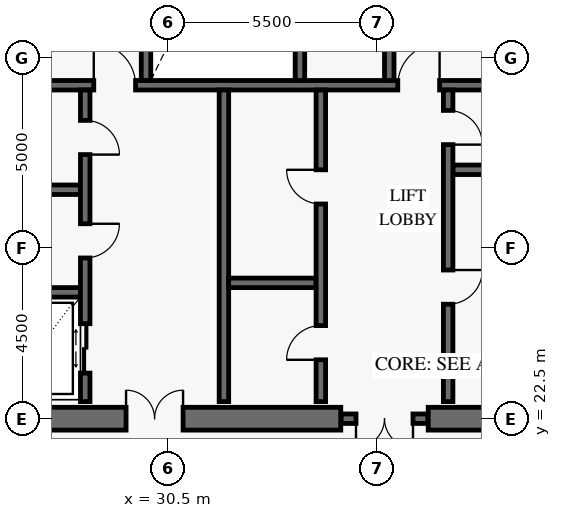
"""IFC4 building model, lengths in metres.
Left out: names, types, materials, properties, quantities, classifications, styles, units other than length and angle.
Written with IfcOpenShell. Run it as: python <this file> out.ifc"""

import sys

from ifc_helpers import new_model, si_unit, direction, frame, frame_2d, origin, place, context, subcontext, project, spatial, rectangle, extrude, element, fill, save


model = new_model("IFC4")
c1 = context("Model", 3, precision=1e-05, world=origin(), true_north=direction((0.0, 1.0)))
c2 = subcontext(c1, "Body", "Model", "MODEL_VIEW")
j1 = project(units=[si_unit("LENGTHUNIT", "METRE"), si_unit("PLANEANGLEUNIT", "RADIAN")], contexts=[c1])
p1 = place(None, origin())
s1 = spatial("IfcSite", under=j1, at=p1, CompositionType="ELEMENT")
p2 = place(p1, origin())
s2 = spatial("IfcBuilding", under=s1, at=p2, CompositionType="ELEMENT")
p3 = place(p2, frame((0.0, 0.0, 265.4)))
s3 = spatial("IfcBuildingStorey", under=s2, at=p3, CompositionType="ELEMENT", Elevation=265.4)
p4 = place(p3, frame((25.2, 22.5, 0.0), z_axis=(0.0, 0.0, 1.0), x_axis=(1.0, 0.0, 0.0)))
e1 = element("IfcWall", 1, at=p4, inside=s3, PredefinedType="SHEAR", context=c2, shape_type="SweptSolid", body=[
    extrude(rectangle(XDim=9.85, YDim=0.6, at=frame_2d((4.925, 0.0))), origin(), (0.0, 0.0, 1.0), 3.8),
])
p5 = place(p4, frame((4.2, 0.0, 0.0)))
e2 = element("IfcOpeningElement", 2, at=p5, cuts=e1, PredefinedType="OPENING", context=c2, shape_type="SweptSolid", body=[
    extrude(rectangle(XDim=1.5, YDim=2.15, at=frame_2d((0.75, 1.075))), frame((0.0, 0.312, 0.0), z_axis=(0.0, -1.0, 0.0), x_axis=(1.0, 0.0, 0.0)), (0.0, 0.0, 1.0), 0.624),
])
p6 = place(p3, frame((37.35, 22.5, 0.0), z_axis=(0.0, 0.0, 1.0), x_axis=(1.0, 0.0, 0.0)))
e3 = element("IfcWall", 3, at=p6, inside=s3, PredefinedType="SHEAR", context=c2, shape_type="SweptSolid", body=[
    extrude(rectangle(XDim=9.45, YDim=0.6, at=frame_2d((4.725, 0.0))), origin(), (0.0, 0.0, 1.0), 3.8),
])
p7 = place(p6, frame((3.95, 0.0, 0.0)))
e4 = element("IfcOpeningElement", 4, at=p7, cuts=e3, PredefinedType="OPENING", context=c2, shape_type="SweptSolid", body=[
    extrude(rectangle(XDim=1.5, YDim=2.15, at=frame_2d((0.75, 1.075))), frame((0.0, 0.312, 0.0), z_axis=(0.0, -1.0, 0.0), x_axis=(1.0, 0.0, 0.0)), (0.0, 0.0, 1.0), 0.624),
])
p8 = place(p3, frame((35.06, 22.5, 0.0), z_axis=(0.0, 0.0, 1.0), x_axis=(1.0, 0.0, 0.0)))
e5 = element("IfcWall", 5, at=p8, inside=s3, PredefinedType="SOLIDWALL", context=c2, shape_type="SweptSolid", body=[
    extrude(rectangle(XDim=2.28, YDim=0.25, at=frame_2d((1.14, 0.0))), origin(), (0.0, 0.0, 1.0), 3.8),
])
p9 = place(p8, frame((0.39, 0.0, 0.0)))
e6 = element("IfcOpeningElement", 6, at=p9, cuts=e5, PredefinedType="OPENING", context=c2, shape_type="SweptSolid", body=[
    extrude(rectangle(XDim=1.5, YDim=2.15, at=frame_2d((0.75, 1.075))), frame((0.0, 0.137, 0.0), z_axis=(0.0, -1.0, 0.0), x_axis=(1.0, 0.0, 0.0)), (0.0, 0.0, 1.0), 0.274),
])
p10 = place(p3, frame((25.95, 31.275, 0.0), z_axis=(0.0, 0.0, 1.0), x_axis=(1.0, 0.0, 0.0)))
e7 = element("IfcWall", 7, at=p10, inside=s3, PredefinedType="SOLIDWALL", context=c2, shape_type="SweptSolid", body=[
    extrude(rectangle(XDim=20.1, YDim=0.25, at=frame_2d((10.05, 0.0))), origin(), (0.0, 0.0, 1.0), 3.8),
])
p11 = place(p10, frame((2.6, 0.0, 0.0)))
e8 = element("IfcOpeningElement", 8, at=p11, cuts=e7, PredefinedType="OPENING", context=c2, shape_type="SweptSolid", body=[
    extrude(rectangle(XDim=1.1, YDim=2.15, at=frame_2d((0.55, 1.075))), frame((0.0, 0.137, 0.0), z_axis=(0.0, -1.0, 0.0), x_axis=(1.0, 0.0, 0.0)), (0.0, 0.0, 1.0), 0.274),
])
p12 = place(p10, frame((10.6, 0.0, 0.0)))
e9 = element("IfcOpeningElement", 9, at=p12, cuts=e7, PredefinedType="OPENING", context=c2, shape_type="SweptSolid", body=[
    extrude(rectangle(XDim=1.1, YDim=2.15, at=frame_2d((0.55, 1.075))), frame((0.0, 0.137, 0.0), z_axis=(0.0, -1.0, 0.0), x_axis=(1.0, 0.0, 0.0)), (0.0, 0.0, 1.0), 0.274),
])
p13 = place(p10, frame((16.35, 0.0, 0.0)))
e10 = element("IfcOpeningElement", 10, at=p13, cuts=e7, PredefinedType="OPENING", context=c2, shape_type="SweptSolid", body=[
    extrude(rectangle(XDim=1.1, YDim=2.15, at=frame_2d((0.55, 1.075))), frame((0.0, 0.137, 0.0), z_axis=(0.0, -1.0, 0.0), x_axis=(1.0, 0.0, 0.0)), (0.0, 0.0, 1.0), 0.274),
])
for number, where, z_axis, x_axis in (
    (11, (29.925, 31.4, 0.0), (0.0, 0.0, 1.0), (0.0, 1.0, 0.0)),
    (12, (33.975, 31.4, 0.0), (0.0, 0.0, 1.0), (0.0, 1.0, 0.0)),
):
    element("IfcWall", number, at=place(p3, frame(where, z_axis=z_axis, x_axis=x_axis)), inside=s3, PredefinedType="SOLIDWALL", context=c2, shape_type="SweptSolid", body=[
        extrude(rectangle(XDim=9.7, YDim=0.25, at=frame_2d((4.85, 0.0))), origin(), (0.0, 0.0, 1.0), 3.8),
    ])
p14 = place(p3, frame((36.325, 31.4, 0.0), z_axis=(0.0, 0.0, 1.0), x_axis=(0.0, 1.0, 0.0)))
e13 = element("IfcWall", 13, at=p14, inside=s3, PredefinedType="SOLIDWALL", context=c2, shape_type="SweptSolid", body=[
    extrude(rectangle(XDim=9.65, YDim=0.25, at=frame_2d((4.825, 0.0))), origin(), (0.0, 0.0, 1.0), 3.8),
])
p15 = place(p14, frame((2.965, 0.0, 0.0)))
e14 = element("IfcOpeningElement", 14, at=p15, cuts=e13, PredefinedType="OPENING", context=c2, shape_type="SweptSolid", body=[
    extrude(rectangle(XDim=0.9, YDim=2.1, at=frame_2d((0.45, 1.05))), frame((0.0, 0.137, 0.0), z_axis=(0.0, -1.0, 0.0), x_axis=(1.0, 0.0, 0.0)), (0.0, 0.0, 1.0), 0.274),
])
p16 = place(p14, frame((7.885, 0.0, 0.0)))
e15 = element("IfcOpeningElement", 15, at=p16, cuts=e13, PredefinedType="OPENING", context=c2, shape_type="SweptSolid", body=[
    extrude(rectangle(XDim=0.9, YDim=2.1, at=frame_2d((0.45, 1.05))), frame((0.0, 0.137, 0.0), z_axis=(0.0, -1.0, 0.0), x_axis=(1.0, 0.0, 0.0)), (0.0, 0.0, 1.0), 0.274),
])
for number, where, z_axis, x_axis in (
    (16, (25.95, 25.825, 0.0), (0.0, 0.0, 1.0), (1.0, 0.0, 0.0)),
    (17, (25.95, 28.525, 0.0), (0.0, 0.0, 1.0), (1.0, 0.0, 0.0)),
):
    element("IfcWall", number, at=place(p3, frame(where, z_axis=z_axis, x_axis=x_axis)), inside=s3, PredefinedType="SOLIDWALL", context=c2, shape_type="SweptSolid", body=[
        extrude(rectangle(XDim=2.25, YDim=0.25, at=frame_2d((1.125, 0.0))), origin(), (0.0, 0.0, 1.0), 3.8),
    ])
p17 = place(p3, frame((28.325, 22.95, 0.0), z_axis=(0.0, 0.0, 1.0), x_axis=(0.0, 1.0, 0.0)))
e18 = element("IfcWall", 18, at=p17, inside=s3, PredefinedType="SOLIDWALL", context=c2, shape_type="SweptSolid", body=[
    extrude(rectangle(XDim=8.2, YDim=0.25, at=frame_2d((4.1, 0.0))), origin(), (0.0, 0.0, 1.0), 3.8),
])
p18 = place(p17, frame((0.75, 0.0, 0.0)))
e19 = element("IfcOpeningElement", 19, at=p18, cuts=e18, PredefinedType="OPENING", context=c2, shape_type="SweptSolid", body=[
    extrude(rectangle(XDim=1.3, YDim=2.3, at=frame_2d((0.65, 1.15))), frame((0.0, 0.137, 0.0), z_axis=(0.0, -1.0, 0.0), x_axis=(1.0, 0.0, 0.0)), (0.0, 0.0, 1.0), 0.274),
])
p19 = place(p17, frame((3.78, 0.0, 0.0)))
e20 = element("IfcOpeningElement", 20, at=p19, cuts=e18, PredefinedType="OPENING", context=c2, shape_type="SweptSolid", body=[
    extrude(rectangle(XDim=0.9, YDim=2.1, at=frame_2d((0.45, 1.05))), frame((0.0, 0.137, 0.0), z_axis=(0.0, -1.0, 0.0), x_axis=(1.0, 0.0, 0.0)), (0.0, 0.0, 1.0), 0.274),
])
p20 = place(p17, frame((6.5, 0.0, 0.0)))
e21 = element("IfcOpeningElement", 21, at=p20, cuts=e18, PredefinedType="OPENING", context=c2, shape_type="SweptSolid", body=[
    extrude(rectangle(XDim=0.9, YDim=2.1, at=frame_2d((0.45, 1.05))), frame((0.0, 0.137, 0.0), z_axis=(0.0, -1.0, 0.0), x_axis=(1.0, 0.0, 0.0)), (0.0, 0.0, 1.0), 0.274),
])
p21 = place(p3, frame((31.975, 22.95, 0.0), z_axis=(0.0, 0.0, 1.0), x_axis=(0.0, 1.0, 0.0)))
e22 = element("IfcWall", 22, at=p21, inside=s3, PredefinedType="SOLIDWALL", context=c2, shape_type="SweptSolid", body=[
    extrude(rectangle(XDim=8.2, YDim=0.25, at=frame_2d((4.1, 0.0))), origin(), (0.0, 0.0, 1.0), 3.8),
])
p22 = place(p3, frame((32.1, 26.075, 0.0), z_axis=(0.0, 0.0, 1.0), x_axis=(1.0, 0.0, 0.0)))
e23 = element("IfcWall", 23, at=p22, inside=s3, PredefinedType="SOLIDWALL", context=c2, shape_type="SweptSolid", body=[
    extrude(rectangle(XDim=2.3, YDim=0.25, at=frame_2d((1.15, 0.0))), origin(), (0.0, 0.0, 1.0), 3.8),
])
p23 = place(p3, frame((34.525, 22.95, 0.0), z_axis=(0.0, 0.0, 1.0), x_axis=(0.0, 1.0, 0.0)))
e24 = element("IfcWall", 24, at=p23, inside=s3, PredefinedType="SOLIDWALL", context=c2, shape_type="SweptSolid", body=[
    extrude(rectangle(XDim=8.2, YDim=0.25, at=frame_2d((4.1, 0.0))), origin(), (0.0, 0.0, 1.0), 3.8),
])
p24 = place(p23, frame((1.1, 0.0, 0.0)))
e25 = element("IfcOpeningElement", 25, at=p24, cuts=e24, PredefinedType="OPENING", context=c2, shape_type="SweptSolid", body=[
    extrude(rectangle(XDim=0.9, YDim=2.1, at=frame_2d((0.45, 1.05))), frame((0.0, 0.137, 0.0), z_axis=(0.0, -1.0, 0.0), x_axis=(1.0, 0.0, 0.0)), (0.0, 0.0, 1.0), 0.274),
])
p25 = place(p23, frame((5.2, 0.0, 0.0)))
e26 = element("IfcOpeningElement", 26, at=p25, cuts=e24, PredefinedType="OPENING", context=c2, shape_type="SweptSolid", body=[
    extrude(rectangle(XDim=0.9, YDim=2.1, at=frame_2d((0.45, 1.05))), frame((0.0, 0.137, 0.0), z_axis=(0.0, -1.0, 0.0), x_axis=(1.0, 0.0, 0.0)), (0.0, 0.0, 1.0), 0.274),
])
p26 = place(p3, frame((38.0, 29.05, 0.0), z_axis=(0.0, 0.0, 1.0), x_axis=(1.0, 0.0, 0.0)))
e27 = element("IfcWall", 27, at=p26, inside=s3, PredefinedType="SOLIDWALL", context=c2, shape_type="SweptSolid", body=[
    extrude(rectangle(XDim=2.3, YDim=0.25, at=frame_2d((1.15, 0.0))), origin(), (0.0, 0.0, 1.0), 3.8),
])
p27 = place(p3, frame((37.875, 22.95, 0.0), z_axis=(0.0, 0.0, 1.0), x_axis=(0.0, 1.0, 0.0)))
e28 = element("IfcWall", 28, at=p27, inside=s3, PredefinedType="SOLIDWALL", context=c2, shape_type="SweptSolid", body=[
    extrude(rectangle(XDim=8.2, YDim=0.25, at=frame_2d((4.1, 0.0))), origin(), (0.0, 0.0, 1.0), 3.8),
])
p28 = place(p27, frame((2.562, 0.0, 0.0)))
e29 = element("IfcOpeningElement", 29, at=p28, cuts=e28, PredefinedType="OPENING", context=c2, shape_type="SweptSolid", body=[
    extrude(rectangle(XDim=0.9, YDim=2.1, at=frame_2d((0.45, 1.05))), frame((0.0, 0.137, 0.0), z_axis=(0.0, -1.0, 0.0), x_axis=(1.0, 0.0, 0.0)), (0.0, 0.0, 1.0), 0.274),
])
p29 = place(p27, frame((6.762, 0.0, 0.0)))
e30 = element("IfcOpeningElement", 30, at=p29, cuts=e28, PredefinedType="OPENING", context=c2, shape_type="SweptSolid", body=[
    extrude(rectangle(XDim=0.9, YDim=2.1, at=frame_2d((0.45, 1.05))), frame((0.0, 0.137, 0.0), z_axis=(0.0, -1.0, 0.0), x_axis=(1.0, 0.0, 0.0)), (0.0, 0.0, 1.0), 0.274),
])
p30 = place(p5, origin())
e31 = element("IfcDoor", 31, at=p30, inside=s3, OperationType="DOUBLE_DOOR_SINGLE_SWING", PredefinedType="DOOR", context=c2, shape_type="SweptSolid", body=[
    extrude(rectangle(XDim=1.5, YDim=2.15, at=frame_2d((0.75, 1.075))), frame((0.0, 0.025, 0.0), z_axis=(0.0, -1.0, 0.0), x_axis=(1.0, 0.0, 0.0)), (0.0, 0.0, 1.0), 0.05),
])
fill(e2, e31)
p31 = place(p9, frame((1.5, 0.0, 0.0), z_axis=(0.0, 0.0, 1.0), x_axis=(-1.0, 0.0, 0.0)))
e32 = element("IfcDoor", 32, at=p31, inside=s3, OperationType="DOUBLE_DOOR_SINGLE_SWING", PredefinedType="DOOR", context=c2, shape_type="SweptSolid", body=[
    extrude(rectangle(XDim=1.5, YDim=2.15, at=frame_2d((0.75, 1.075))), frame((0.0, 0.025, 0.0), z_axis=(0.0, -1.0, 0.0), x_axis=(1.0, 0.0, 0.0)), (0.0, 0.0, 1.0), 0.05),
])
fill(e6, e32)
p32 = place(p11, origin())
e33 = element("IfcDoor", 33, at=p32, inside=s3, OperationType="SINGLE_SWING_LEFT", PredefinedType="USERDEFINED", context=c2, shape_type="SweptSolid", body=[
    extrude(rectangle(XDim=1.1, YDim=2.15, at=frame_2d((0.55, 1.075))), frame((0.0, 0.025, 0.0), z_axis=(0.0, -1.0, 0.0), x_axis=(1.0, 0.0, 0.0)), (0.0, 0.0, 1.0), 0.05),
])
fill(e8, e33)
p33 = place(p12, origin())
e34 = element("IfcDoor", 34, at=p33, inside=s3, OperationType="SINGLE_SWING_RIGHT", PredefinedType="USERDEFINED", context=c2, shape_type="SweptSolid", body=[
    extrude(rectangle(XDim=1.1, YDim=2.15, at=frame_2d((0.55, 1.075))), frame((0.0, 0.025, 0.0), z_axis=(0.0, -1.0, 0.0), x_axis=(1.0, 0.0, 0.0)), (0.0, 0.0, 1.0), 0.05),
])
fill(e9, e34)
p34 = place(p18, frame((1.3, 0.0, 0.0), z_axis=(0.0, 0.0, 1.0), x_axis=(-1.0, 0.0, 0.0)))
e35 = element("IfcDoor", 35, at=p34, inside=s3, OperationType="DOUBLE_DOOR_SLIDING", PredefinedType="DOOR", context=c2, shape_type="SweptSolid", body=[
    extrude(rectangle(XDim=1.3, YDim=2.3, at=frame_2d((0.65, 1.15))), frame((0.0, 0.025, 0.0), z_axis=(0.0, -1.0, 0.0), x_axis=(1.0, 0.0, 0.0)), (0.0, 0.0, 1.0), 0.05),
])
fill(e19, e35)
p35 = place(p19, frame((0.9, 0.0, 0.0), z_axis=(0.0, 0.0, 1.0), x_axis=(-1.0, 0.0, 0.0)))
e36 = element("IfcDoor", 36, at=p35, inside=s3, OperationType="SINGLE_SWING_LEFT", PredefinedType="DOOR", context=c2, shape_type="SweptSolid", body=[
    extrude(rectangle(XDim=0.9, YDim=2.1, at=frame_2d((0.45, 1.05))), frame((0.0, 0.025, 0.0), z_axis=(0.0, -1.0, 0.0), x_axis=(1.0, 0.0, 0.0)), (0.0, 0.0, 1.0), 0.05),
])
fill(e20, e36)
p36 = place(p20, frame((0.9, 0.0, 0.0), z_axis=(0.0, 0.0, 1.0), x_axis=(-1.0, 0.0, 0.0)))
e37 = element("IfcDoor", 37, at=p36, inside=s3, OperationType="SINGLE_SWING_RIGHT", PredefinedType="DOOR", context=c2, shape_type="SweptSolid", body=[
    extrude(rectangle(XDim=0.9, YDim=2.1, at=frame_2d((0.45, 1.05))), frame((0.0, 0.025, 0.0), z_axis=(0.0, -1.0, 0.0), x_axis=(1.0, 0.0, 0.0)), (0.0, 0.0, 1.0), 0.05),
])
fill(e21, e37)
p37 = place(p24, origin())
e38 = element("IfcDoor", 38, at=p37, inside=s3, OperationType="SINGLE_SWING_LEFT", PredefinedType="DOOR", context=c2, shape_type="SweptSolid", body=[
    extrude(rectangle(XDim=0.9, YDim=2.1, at=frame_2d((0.45, 1.05))), frame((0.0, 0.025, 0.0), z_axis=(0.0, -1.0, 0.0), x_axis=(1.0, 0.0, 0.0)), (0.0, 0.0, 1.0), 0.05),
])
fill(e25, e38)
p38 = place(p25, origin())
e39 = element("IfcDoor", 39, at=p38, inside=s3, OperationType="SINGLE_SWING_RIGHT", PredefinedType="DOOR", context=c2, shape_type="SweptSolid", body=[
    extrude(rectangle(XDim=0.9, YDim=2.1, at=frame_2d((0.45, 1.05))), frame((0.0, 0.025, 0.0), z_axis=(0.0, -1.0, 0.0), x_axis=(1.0, 0.0, 0.0)), (0.0, 0.0, 1.0), 0.05),
])
fill(e26, e39)
p39 = place(p28, frame((0.9, 0.0, 0.0), z_axis=(0.0, 0.0, 1.0), x_axis=(-1.0, 0.0, 0.0)))
e40 = element("IfcDoor", 40, at=p39, inside=s3, OperationType="SINGLE_SWING_LEFT", PredefinedType="DOOR", context=c2, shape_type="SweptSolid", body=[
    extrude(rectangle(XDim=0.9, YDim=2.1, at=frame_2d((0.45, 1.05))), frame((0.0, 0.025, 0.0), z_axis=(0.0, -1.0, 0.0), x_axis=(1.0, 0.0, 0.0)), (0.0, 0.0, 1.0), 0.05),
])
fill(e29, e40)
p40 = place(p29, frame((0.9, 0.0, 0.0), z_axis=(0.0, 0.0, 1.0), x_axis=(-1.0, 0.0, 0.0)))
e41 = element("IfcDoor", 41, at=p40, inside=s3, OperationType="SINGLE_SWING_RIGHT", PredefinedType="DOOR", context=c2, shape_type="SweptSolid", body=[
    extrude(rectangle(XDim=0.9, YDim=2.1, at=frame_2d((0.45, 1.05))), frame((0.0, 0.025, 0.0), z_axis=(0.0, -1.0, 0.0), x_axis=(1.0, 0.0, 0.0)), (0.0, 0.0, 1.0), 0.05),
])
fill(e30, e41)
save(model, sys.argv[1])
